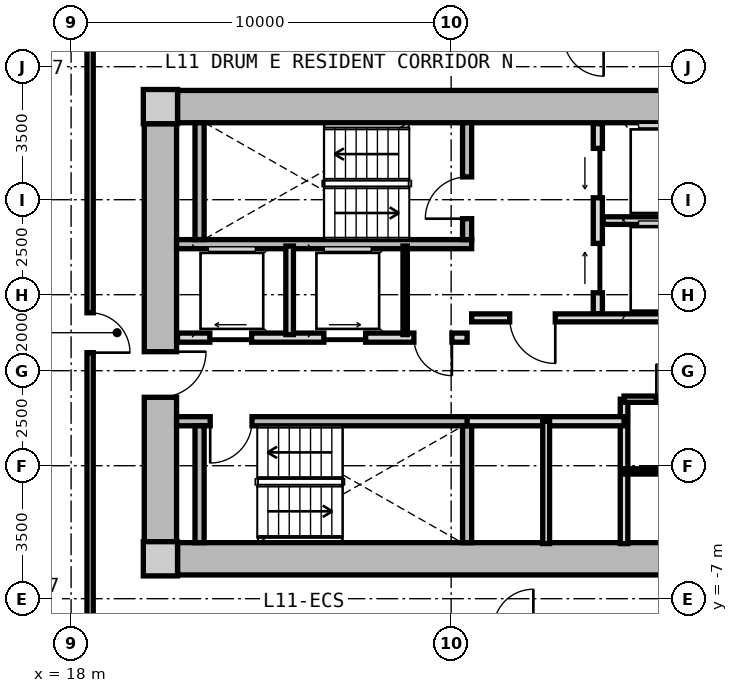
"""IFC4 building model, lengths in metres.
Left out: names, types, materials, properties, quantities, classifications, styles, units other than length and angle.
Written with IfcOpenShell. Run it as: python <this file> out.ifc"""

import sys

from ifc_helpers import new_model, si_unit, direction, frame, frame_2d, origin, origin_2d, place, context, subcontext, project, spatial, rectangle, extrude, source, transform, mapped, element, fill, save


model = new_model("IFC4")
c1 = context("Model", 3, precision=1e-05, world=origin(), true_north=direction((0.0, 1.0)))
c2 = subcontext(c1, "Body", "Model", "MODEL_VIEW")
j1 = project(units=[si_unit("LENGTHUNIT", "METRE"), si_unit("PLANEANGLEUNIT", "RADIAN")], contexts=[c1])
p1 = place(None, origin())
s1 = spatial("IfcSite", under=j1, at=p1, CompositionType="ELEMENT")
p2 = place(p1, origin())
s2 = spatial("IfcBuilding", under=s1, at=p2, CompositionType="ELEMENT")
p3 = place(p2, frame((0.0, 0.0, 39.9)))
s3 = spatial("IfcBuildingStorey", under=s2, at=p3, CompositionType="ELEMENT", Elevation=39.9)
m1 = source(origin(), c2, "Body", "SweptSolid", [
    extrude(rectangle(XDim=0.9, YDim=0.9, at=origin_2d()), origin(), (0.0, 0.0, 1.0), 3.05),
])
for number, where, z_axis, x_axis in (
    (1, (20.35, -5.95, 0.0), (0.0, 0.0, 1.0), (1.0, 0.0, 0.0)),
    (2, (20.35, 5.95, 0.0), (0.0, 0.0, 1.0), (1.0, 0.0, 0.0)),
):
    element("IfcColumn", number, at=place(p3, frame(where, z_axis=z_axis, x_axis=x_axis)), inside=s3, PredefinedType="COLUMN", context=c2, shape_type="MappedRepresentation", body=[
        mapped(m1, transform((0.0, 0.0, 0.0), x_axis=(1.0, 0.0, 0.0), y_axis=(0.0, 1.0, 0.0), z_axis=(0.0, 0.0, 1.0), scale=1.0)),
    ])
m2 = source(origin(), c2, "Body", "SweptSolid", [
    extrude(rectangle(XDim=14.4, YDim=0.85, at=frame_2d((7.2, 0.0))), origin(), (0.0, 0.0, 1.0), 2.79),
])
for number, where, z_axis, x_axis in (
    (3, (20.8, 5.95, 0.0), (0.0, 0.0, 1.0), (1.0, 0.0, 0.0)),
    (4, (35.2, -5.95, 0.0), (0.0, 0.0, 1.0), (-1.0, 0.0, 0.0)),
):
    element("IfcWall", number, at=place(p3, frame(where, z_axis=z_axis, x_axis=x_axis)), inside=s3, PredefinedType="SHEAR", context=c2, shape_type="MappedRepresentation", body=[
        mapped(m2, transform((0.0, 0.0, 0.0), x_axis=(1.0, 0.0, 0.0), y_axis=(0.0, 1.0, 0.0), z_axis=(0.0, 0.0, 1.0), scale=1.0)),
    ])
m3 = source(origin(), c2, "Body", "SweptSolid", [
    extrude(rectangle(XDim=11.0, YDim=0.85, at=frame_2d((5.5, 0.0))), origin(), (0.0, 0.0, 1.0), 2.79),
])
p4 = place(p3, frame((20.35, -5.5, 0.0), z_axis=(0.0, 0.0, 1.0), x_axis=(0.0, 1.0, 0.0)))
e5 = element("IfcWall", 5, at=p4, inside=s3, PredefinedType="SHEAR", context=c2, shape_type="MappedRepresentation", body=[
    mapped(m3, transform((0.0, 0.0, 0.0), x_axis=(1.0, 0.0, 0.0), y_axis=(0.0, 1.0, 0.0), z_axis=(0.0, 0.0, 1.0), scale=1.0)),
])
p5 = place(p4, frame((3.8, 0.0, 0.0)))
e6 = element("IfcOpeningElement", 6, at=p5, cuts=e5, PredefinedType="OPENING", context=c2, shape_type="SweptSolid", body=[
    extrude(rectangle(XDim=1.2, YDim=2.15, at=frame_2d((0.6, 1.075))), frame((0.0, 0.435, 0.0), z_axis=(0.0, -1.0, 0.0), x_axis=(1.0, 0.0, 0.0)), (0.0, 0.0, 1.0), 0.87),
])
m4 = source(origin(), c2, "Body", "SweptSolid", [
    extrude(rectangle(XDim=7.765, YDim=0.24, at=frame_2d((3.883, 0.0))), origin(), (0.0, 0.0, 1.0), 2.79),
])
p6 = place(p3, frame((20.775, 2.33, 0.0), z_axis=(0.0, 0.0, 1.0), x_axis=(1.0, 0.0, 0.0)))
e7 = element("IfcWall", 7, at=p6, inside=s3, PredefinedType="PARTITIONING", context=c2, shape_type="MappedRepresentation", body=[
    mapped(m4, transform((0.0, 0.0, 0.0), x_axis=(1.0, 0.0, 0.0), y_axis=(0.0, 1.0, 0.0), z_axis=(0.0, 0.0, 1.0), scale=1.0)),
])
m5 = source(origin(), c2, "Body", "SweptSolid", [
    extrude(rectangle(XDim=3.075, YDim=0.24, at=frame_2d((1.538, 0.0))), origin(), (0.0, 0.0, 1.0), 2.79),
])
p7 = place(p3, frame((21.38, 2.45, 0.0), z_axis=(0.0, 0.0, 1.0), x_axis=(0.0, 1.0, 0.0)))
e8 = element("IfcWall", 8, at=p7, inside=s3, PredefinedType="PARTITIONING", context=c2, shape_type="MappedRepresentation", body=[
    mapped(m5, transform((0.0, 0.0, 0.0), x_axis=(1.0, 0.0, 0.0), y_axis=(0.0, 1.0, 0.0), z_axis=(0.0, 0.0, 1.0), scale=1.0)),
])
p8 = place(p3, frame((28.42, 2.45, 0.0), z_axis=(0.0, 0.0, 1.0), x_axis=(0.0, 1.0, 0.0)))
e9 = element("IfcWall", 9, at=p8, inside=s3, PredefinedType="PARTITIONING", context=c2, shape_type="MappedRepresentation", body=[
    mapped(m5, transform((0.0, 0.0, 0.0), x_axis=(1.0, 0.0, 0.0), y_axis=(0.0, 1.0, 0.0), z_axis=(0.0, 0.0, 1.0), scale=1.0)),
])
p9 = place(p8, frame((0.55, 0.0, 0.0)))
e10 = element("IfcOpeningElement", 10, at=p9, cuts=e9, PredefinedType="OPENING", context=c2, shape_type="SweptSolid", body=[
    extrude(rectangle(XDim=1.1, YDim=2.15, at=frame_2d((0.55, 1.075))), frame((0.0, 0.13, 0.0), z_axis=(0.0, -1.0, 0.0), x_axis=(1.0, 0.0, 0.0)), (0.0, 0.0, 1.0), 0.26),
])
p10 = place(p3, frame((20.775, -2.33, 0.0), z_axis=(0.0, 0.0, 1.0), x_axis=(1.0, 0.0, 0.0)))
e11 = element("IfcWall", 11, at=p10, inside=s3, PredefinedType="PARTITIONING", context=c2, shape_type="MappedRepresentation", body=[
    mapped(m4, transform((0.0, 0.0, 0.0), x_axis=(1.0, 0.0, 0.0), y_axis=(0.0, 1.0, 0.0), z_axis=(0.0, 0.0, 1.0), scale=1.0)),
])
p11 = place(p10, frame((0.885, 0.0, 0.0)))
e12 = element("IfcOpeningElement", 12, at=p11, cuts=e11, PredefinedType="OPENING", context=c2, shape_type="SweptSolid", body=[
    extrude(rectangle(XDim=1.1, YDim=2.15, at=frame_2d((0.55, 1.075))), frame((0.0, 0.13, 0.0), z_axis=(0.0, -1.0, 0.0), x_axis=(1.0, 0.0, 0.0)), (0.0, 0.0, 1.0), 0.26),
])
for number, where, z_axis, x_axis in (
    (13, (21.38, -5.525, 0.0), (0.0, 0.0, 1.0), (0.0, 1.0, 0.0)),
    (14, (28.42, -5.525, 0.0), (0.0, 0.0, 1.0), (0.0, 1.0, 0.0)),
):
    element("IfcWall", number, at=place(p3, frame(where, z_axis=z_axis, x_axis=x_axis)), inside=s3, PredefinedType="PARTITIONING", context=c2, shape_type="MappedRepresentation", body=[
        mapped(m5, transform((0.0, 0.0, 0.0), x_axis=(1.0, 0.0, 0.0), y_axis=(0.0, 1.0, 0.0), z_axis=(0.0, 0.0, 1.0), scale=1.0)),
    ])
m6 = source(origin(), c2, "Body", "SweptSolid", [
    extrude(rectangle(XDim=5.0, YDim=0.24, at=frame_2d((2.5, 0.0))), origin(), (0.0, 0.0, 1.0), 2.775),
])
p12 = place(p3, frame((31.86, 0.5, 0.0), z_axis=(0.0, 0.0, 1.0), x_axis=(0.0, 1.0, 0.0)))
e15 = element("IfcWall", 15, at=p12, inside=s3, PredefinedType="PARTITIONING", context=c2, shape_type="MappedRepresentation", body=[
    mapped(m6, transform((0.0, 0.0, 0.0), x_axis=(1.0, 0.0, 0.0), y_axis=(0.0, 1.0, 0.0), z_axis=(0.0, 0.0, 1.0), scale=1.0)),
])
p13 = place(p12, frame((3.05, 0.0, 0.0)))
e16 = element("IfcOpeningElement", 16, at=p13, cuts=e15, PredefinedType="OPENING", context=c2, shape_type="SweptSolid", body=[
    extrude(rectangle(XDim=1.3, YDim=2.2, at=frame_2d((0.65, 1.1))), frame((0.0, 0.13, 0.0), z_axis=(0.0, -1.0, 0.0), x_axis=(1.0, 0.0, 0.0)), (0.0, 0.0, 1.0), 0.26),
])
p14 = place(p12, frame((0.55, 0.0, 0.0)))
e17 = element("IfcOpeningElement", 17, at=p14, cuts=e15, PredefinedType="OPENING", context=c2, shape_type="SweptSolid", body=[
    extrude(rectangle(XDim=1.3, YDim=2.2, at=frame_2d((0.65, 1.1))), frame((0.0, 0.13, 0.0), z_axis=(0.0, -1.0, 0.0), x_axis=(1.0, 0.0, 0.0)), (0.0, 0.0, 1.0), 0.26),
])
m7 = source(origin(), c2, "Body", "SweptSolid", [
    extrude(rectangle(XDim=3.2, YDim=0.2, at=frame_2d((1.6, 0.0))), origin(), (0.0, 0.0, 1.0), 2.775),
])
p15 = place(p3, frame((32.0, 2.95, 0.0), z_axis=(0.0, 0.0, 1.0), x_axis=(1.0, 0.0, 0.0)))
e18 = element("IfcWall", 18, at=p15, inside=s3, PredefinedType="PARTITIONING", context=c2, shape_type="MappedRepresentation", body=[
    mapped(m7, transform((0.0, 0.0, 0.0), x_axis=(1.0, 0.0, 0.0), y_axis=(0.0, 1.0, 0.0), z_axis=(0.0, 0.0, 1.0), scale=1.0)),
])
m8 = source(origin(), c2, "Body", "SweptSolid", [
    extrude(rectangle(XDim=6.66, YDim=0.21, at=frame_2d((3.33, 0.0))), origin(), (0.0, 0.0, 1.0), 2.775),
])
p16 = place(p3, frame((28.54, 0.39, 0.0), z_axis=(0.0, 0.0, 1.0), x_axis=(1.0, 0.0, 0.0)))
e19 = element("IfcWall", 19, at=p16, inside=s3, PredefinedType="PARTITIONING", context=c2, shape_type="MappedRepresentation", body=[
    mapped(m8, transform((0.0, 0.0, 0.0), x_axis=(1.0, 0.0, 0.0), y_axis=(0.0, 1.0, 0.0), z_axis=(0.0, 0.0, 1.0), scale=1.0)),
])
p17 = place(p16, frame((1.0, 0.0, 0.0)))
e20 = element("IfcOpeningElement", 20, at=p17, cuts=e19, PredefinedType="OPENING", context=c2, shape_type="SweptSolid", body=[
    extrude(rectangle(XDim=1.2, YDim=2.15, at=frame_2d((0.6, 1.075))), frame((0.0, 0.115, 0.0), z_axis=(0.0, -1.0, 0.0), x_axis=(1.0, 0.0, 0.0)), (0.0, 0.0, 1.0), 0.23),
])
m9 = source(origin(), c2, "Body", "SweptSolid", [
    extrude(rectangle(XDim=7.62, YDim=0.24, at=frame_2d((3.81, 0.0))), origin(), (0.0, 0.0, 1.0), 2.775),
])
p18 = place(p3, frame((20.8, -0.13, 0.0), z_axis=(0.0, 0.0, 1.0), x_axis=(1.0, 0.0, 0.0)))
e21 = element("IfcWall", 21, at=p18, inside=s3, PredefinedType="PARTITIONING", context=c2, shape_type="MappedRepresentation", body=[
    mapped(m9, transform((0.0, 0.0, 0.0), x_axis=(1.0, 0.0, 0.0), y_axis=(0.0, 1.0, 0.0), z_axis=(0.0, 0.0, 1.0), scale=1.0)),
])
p19 = place(p18, frame((6.22, 0.0, 0.0)))
e22 = element("IfcOpeningElement", 22, at=p19, cuts=e21, PredefinedType="OPENING", context=c2, shape_type="SweptSolid", body=[
    extrude(rectangle(XDim=1.0, YDim=2.1, at=frame_2d((0.5, 1.05))), frame((0.0, 0.13, 0.0), z_axis=(0.0, -1.0, 0.0), x_axis=(1.0, 0.0, 0.0)), (0.0, 0.0, 1.0), 0.26),
])
p20 = place(p18, frame((0.85, 0.0, 0.0)))
e23 = element("IfcOpeningElement", 23, at=p20, cuts=e21, PredefinedType="OPENING", context=c2, shape_type="SweptSolid", body=[
    extrude(rectangle(XDim=1.1, YDim=2.2, at=frame_2d((0.55, 1.1))), frame((0.0, 0.13, 0.0), z_axis=(0.0, -1.0, 0.0), x_axis=(1.0, 0.0, 0.0)), (0.0, 0.0, 1.0), 0.26),
])
p21 = place(p18, frame((3.85, 0.0, 0.0)))
e24 = element("IfcOpeningElement", 24, at=p21, cuts=e21, PredefinedType="OPENING", context=c2, shape_type="SweptSolid", body=[
    extrude(rectangle(XDim=1.1, YDim=2.2, at=frame_2d((0.55, 1.1))), frame((0.0, 0.13, 0.0), z_axis=(0.0, -1.0, 0.0), x_axis=(1.0, 0.0, 0.0)), (0.0, 0.0, 1.0), 0.26),
])
m10 = source(origin(), c2, "Body", "SweptSolid", [
    extrude(rectangle(XDim=2.33, YDim=0.115, at=frame_2d((1.165, 0.0))), origin(), (0.0, 0.0, 1.0), 2.775),
])
p22 = place(p3, frame((26.79, -0.05, 0.0), z_axis=(0.0, 0.0, 1.0), x_axis=(0.0, 1.0, 0.0)))
e25 = element("IfcWall", 25, at=p22, inside=s3, PredefinedType="PARTITIONING", context=c2, shape_type="MappedRepresentation", body=[
    mapped(m10, transform((0.0, 0.0, 0.0), x_axis=(1.0, 0.0, 0.0), y_axis=(0.0, 1.0, 0.0), z_axis=(0.0, 0.0, 1.0), scale=1.0)),
])
m11 = source(origin(), c2, "Body", "SweptSolid", [
    extrude(rectangle(XDim=2.33, YDim=0.2, at=frame_2d((1.165, 0.0))), origin(), (0.0, 0.0, 1.0), 2.775),
])
p23 = place(p3, frame((23.75, -0.05, 0.0), z_axis=(0.0, 0.0, 1.0), x_axis=(0.0, 1.0, 0.0)))
e26 = element("IfcWall", 26, at=p23, inside=s3, PredefinedType="PARTITIONING", context=c2, shape_type="MappedRepresentation", body=[
    mapped(m11, transform((0.0, 0.0, 0.0), x_axis=(1.0, 0.0, 0.0), y_axis=(0.0, 1.0, 0.0), z_axis=(0.0, 0.0, 1.0), scale=1.0)),
])
m12 = source(origin(), c2, "Body", "SweptSolid", [
    extrude(rectangle(XDim=3.8, YDim=0.2, at=frame_2d((1.9, 0.0))), origin(), (0.0, 0.0, 1.0), 2.775),
])
p24 = place(p3, frame((32.55, -5.55, 0.0), z_axis=(0.0, 0.0, 1.0), x_axis=(0.0, 1.0, 0.0)))
e27 = element("IfcWall", 27, at=p24, inside=s3, PredefinedType="PARTITIONING", context=c2, shape_type="MappedRepresentation", body=[
    mapped(m12, transform((0.0, 0.0, 0.0), x_axis=(1.0, 0.0, 0.0), y_axis=(0.0, 1.0, 0.0), z_axis=(0.0, 0.0, 1.0), scale=1.0)),
])
m13 = source(origin(), c2, "Body", "SweptSolid", [
    extrude(rectangle(XDim=4.13, YDim=0.24, at=frame_2d((2.065, 0.0))), origin(), (0.0, 0.0, 1.0), 2.775),
])
p25 = place(p3, frame((28.42, -2.33, 0.0), z_axis=(0.0, 0.0, 1.0), x_axis=(1.0, 0.0, 0.0)))
e28 = element("IfcWall", 28, at=p25, inside=s3, PredefinedType="PARTITIONING", context=c2, shape_type="MappedRepresentation", body=[
    mapped(m13, transform((0.0, 0.0, 0.0), x_axis=(1.0, 0.0, 0.0), y_axis=(0.0, 1.0, 0.0), z_axis=(0.0, 0.0, 1.0), scale=1.0)),
])
m14 = source(origin(), c2, "Body", "SweptSolid", [
    extrude(rectangle(XDim=3.22, YDim=0.18, at=frame_2d((1.61, 0.0))), origin(), (0.0, 0.0, 1.0), 2.775),
])
p26 = place(p3, frame((30.5, -5.55, 0.0), z_axis=(0.0, 0.0, 1.0), x_axis=(0.0, 1.0, 0.0)))
e29 = element("IfcWall", 29, at=p26, inside=s3, PredefinedType="PARTITIONING", context=c2, shape_type="MappedRepresentation", body=[
    mapped(m14, transform((0.0, 0.0, 0.0), x_axis=(1.0, 0.0, 0.0), y_axis=(0.0, 1.0, 0.0), z_axis=(0.0, 0.0, 1.0), scale=1.0)),
])
m15 = source(origin(), c2, "Body", "SweptSolid", [
    extrude(rectangle(XDim=2.7, YDim=0.165, at=frame_2d((1.35, 0.0))), origin(), (0.0, 0.0, 1.0), 2.775),
])
p27 = place(p3, frame((32.55, -1.75, 0.0), z_axis=(0.0, 0.0, 1.0), x_axis=(1.0, 0.0, 0.0)))
e30 = element("IfcWall", 30, at=p27, inside=s3, PredefinedType="PARTITIONING", context=c2, shape_type="MappedRepresentation", body=[
    mapped(m15, transform((0.0, 0.0, 0.0), x_axis=(1.0, 0.0, 0.0), y_axis=(0.0, 1.0, 0.0), z_axis=(0.0, 0.0, 1.0), scale=1.0)),
])
p28 = place(p27, frame((0.85, 0.0, 0.0)))
e31 = element("IfcOpeningElement", 31, at=p28, cuts=e30, PredefinedType="OPENING", context=c2, shape_type="SweptSolid", body=[
    extrude(rectangle(XDim=0.925, YDim=2.1, at=frame_2d((0.462, 1.05))), frame((0.0, 0.093, 0.0), z_axis=(0.0, -1.0, 0.0), x_axis=(1.0, 0.0, 0.0)), (0.0, 0.0, 1.0), 0.185),
])
m16 = source(origin(), c2, "Body", "SweptSolid", [
    extrude(rectangle(XDim=2.7, YDim=0.14, at=frame_2d((1.35, 0.0))), origin(), (0.0, 0.0, 1.0), 2.775),
])
p29 = place(p3, frame((32.55, -3.65, 0.0), z_axis=(0.0, 0.0, 1.0), x_axis=(1.0, 0.0, 0.0)))
e32 = element("IfcWall", 32, at=p29, inside=s3, PredefinedType="PARTITIONING", context=c2, shape_type="MappedRepresentation", body=[
    mapped(m16, transform((0.0, 0.0, 0.0), x_axis=(1.0, 0.0, 0.0), y_axis=(0.0, 1.0, 0.0), z_axis=(0.0, 0.0, 1.0), scale=1.0)),
])
m17 = source(origin(), c2, "Body", "SweptSolid", [
    extrude(rectangle(XDim=15.6, YDim=0.165, at=frame_2d((7.8, 0.0))), origin(), (0.0, 0.0, 1.0), 2.775),
])
p30 = place(p3, frame((18.5, -7.8, 0.0), z_axis=(0.0, 0.0, 1.0), x_axis=(0.0, 1.0, 0.0)))
e33 = element("IfcWall", 33, at=p30, inside=s3, PredefinedType="PARTITIONING", context=c2, shape_type="MappedRepresentation", body=[
    mapped(m17, transform((0.0, 0.0, 0.0), x_axis=(1.0, 0.0, 0.0), y_axis=(0.0, 1.0, 0.0), z_axis=(0.0, 0.0, 1.0), scale=1.0)),
])
p31 = place(p30, frame((7.275, 0.0, 0.0)))
e34 = element("IfcOpeningElement", 34, at=p31, cuts=e33, PredefinedType="OPENING", context=c2, shape_type="SweptSolid", body=[
    extrude(rectangle(XDim=1.05, YDim=2.15, at=frame_2d((0.525, 1.075))), frame((0.0, 0.093, 0.0), z_axis=(0.0, -1.0, 0.0), x_axis=(1.0, 0.0, 0.0)), (0.0, 0.0, 1.0), 0.185),
])
m18 = source(origin(), c2, "Body", "SweptSolid", [
    extrude(rectangle(XDim=1.1, YDim=2.15, at=frame_2d((0.55, 1.075))), frame((0.0, 0.025, 0.0), z_axis=(0.0, -1.0, 0.0), x_axis=(1.0, 0.0, 0.0)), (0.0, 0.0, 1.0), 0.05),
])
p32 = place(p9, origin())
e35 = element("IfcDoor", 35, at=p32, inside=s3, OperationType="SINGLE_SWING_LEFT", PredefinedType="DOOR", context=c2, shape_type="MappedRepresentation", body=[
    mapped(m18, transform((0.0, 0.0, 0.0), x_axis=(1.0, 0.0, 0.0), y_axis=(0.0, 1.0, 0.0), z_axis=(0.0, 0.0, 1.0), scale=1.0)),
])
fill(e10, e35)
p33 = place(p11, frame((1.1, 0.0, 0.0), z_axis=(0.0, 0.0, 1.0), x_axis=(-1.0, 0.0, 0.0)))
e36 = element("IfcDoor", 36, at=p33, inside=s3, OperationType="SINGLE_SWING_RIGHT", PredefinedType="DOOR", context=c2, shape_type="MappedRepresentation", body=[
    mapped(m18, transform((0.0, 0.0, 0.0), x_axis=(1.0, 0.0, 0.0), y_axis=(0.0, 1.0, 0.0), z_axis=(0.0, 0.0, 1.0), scale=1.0)),
])
fill(e12, e36)
m19 = source(origin(), c2, "Body", "SweptSolid", [
    extrude(rectangle(XDim=1.3, YDim=2.2, at=frame_2d((0.65, 1.1))), frame((0.0, 0.025, 0.0), z_axis=(0.0, -1.0, 0.0), x_axis=(1.0, 0.0, 0.0)), (0.0, 0.0, 1.0), 0.05),
])
p34 = place(p13, origin())
e37 = element("IfcDoor", 37, at=p34, inside=s3, OperationType="SLIDING_TO_LEFT", PredefinedType="DOOR", context=c2, shape_type="MappedRepresentation", body=[
    mapped(m19, transform((0.0, 0.0, 0.0), x_axis=(1.0, 0.0, 0.0), y_axis=(0.0, 1.0, 0.0), z_axis=(0.0, 0.0, 1.0), scale=1.0)),
])
fill(e16, e37)
p35 = place(p14, origin())
e38 = element("IfcDoor", 38, at=p35, inside=s3, OperationType="SLIDING_TO_RIGHT", PredefinedType="DOOR", context=c2, shape_type="MappedRepresentation", body=[
    mapped(m19, transform((0.0, 0.0, 0.0), x_axis=(1.0, 0.0, 0.0), y_axis=(0.0, 1.0, 0.0), z_axis=(0.0, 0.0, 1.0), scale=1.0)),
])
fill(e17, e38)
m20 = source(origin(), c2, "Body", "SweptSolid", [
    extrude(rectangle(XDim=1.2, YDim=2.15, at=frame_2d((0.6, 1.075))), frame((0.0, 0.025, 0.0), z_axis=(0.0, -1.0, 0.0), x_axis=(1.0, 0.0, 0.0)), (0.0, 0.0, 1.0), 0.05),
])
p36 = place(p17, frame((1.2, 0.0, 0.0), z_axis=(0.0, 0.0, 1.0), x_axis=(-1.0, 0.0, 0.0)))
e39 = element("IfcDoor", 39, at=p36, inside=s3, OperationType="SINGLE_SWING_LEFT", PredefinedType="DOOR", context=c2, shape_type="MappedRepresentation", body=[
    mapped(m20, transform((0.0, 0.0, 0.0), x_axis=(1.0, 0.0, 0.0), y_axis=(0.0, 1.0, 0.0), z_axis=(0.0, 0.0, 1.0), scale=1.0)),
])
fill(e20, e39)
p37 = place(p5, frame((1.2, 0.0, 0.0), z_axis=(0.0, 0.0, 1.0), x_axis=(-1.0, 0.0, 0.0)))
e40 = element("IfcDoor", 40, at=p37, inside=s3, OperationType="SINGLE_SWING_LEFT", PredefinedType="DOOR", context=c2, shape_type="MappedRepresentation", body=[
    mapped(m20, transform((0.0, 0.0, 0.0), x_axis=(1.0, 0.0, 0.0), y_axis=(0.0, 1.0, 0.0), z_axis=(0.0, 0.0, 1.0), scale=1.0)),
])
fill(e6, e40)
m21 = source(origin(), c2, "Body", "SweptSolid", [
    extrude(rectangle(XDim=1.0, YDim=2.1, at=frame_2d((0.5, 1.05))), frame((0.0, 0.025, 0.0), z_axis=(0.0, -1.0, 0.0), x_axis=(1.0, 0.0, 0.0)), (0.0, 0.0, 1.0), 0.05),
])
p38 = place(p19, frame((1.0, 0.0, 0.0), z_axis=(0.0, 0.0, 1.0), x_axis=(-1.0, 0.0, 0.0)))
e41 = element("IfcDoor", 41, at=p38, inside=s3, OperationType="SINGLE_SWING_LEFT", PredefinedType="DOOR", context=c2, shape_type="MappedRepresentation", body=[
    mapped(m21, transform((0.0, 0.0, 0.0), x_axis=(1.0, 0.0, 0.0), y_axis=(0.0, 1.0, 0.0), z_axis=(0.0, 0.0, 1.0), scale=1.0)),
])
fill(e22, e41)
m22 = source(origin(), c2, "Body", "SweptSolid", [
    extrude(rectangle(XDim=1.1, YDim=2.2, at=frame_2d((0.55, 1.1))), frame((0.0, 0.025, 0.0), z_axis=(0.0, -1.0, 0.0), x_axis=(1.0, 0.0, 0.0)), (0.0, 0.0, 1.0), 0.05),
])
p39 = place(p20, origin())
e42 = element("IfcDoor", 42, at=p39, inside=s3, OperationType="SLIDING_TO_LEFT", PredefinedType="DOOR", context=c2, shape_type="MappedRepresentation", body=[
    mapped(m22, transform((0.0, 0.0, 0.0), x_axis=(1.0, 0.0, 0.0), y_axis=(0.0, 1.0, 0.0), z_axis=(0.0, 0.0, 1.0), scale=1.0)),
])
fill(e23, e42)
p40 = place(p21, origin())
e43 = element("IfcDoor", 43, at=p40, inside=s3, OperationType="SLIDING_TO_RIGHT", PredefinedType="DOOR", context=c2, shape_type="MappedRepresentation", body=[
    mapped(m22, transform((0.0, 0.0, 0.0), x_axis=(1.0, 0.0, 0.0), y_axis=(0.0, 1.0, 0.0), z_axis=(0.0, 0.0, 1.0), scale=1.0)),
])
fill(e24, e43)
m23 = source(origin(), c2, "Body", "SweptSolid", [
    extrude(rectangle(XDim=0.925, YDim=2.1, at=frame_2d((0.462, 1.05))), frame((0.0, 0.025, 0.0), z_axis=(0.0, -1.0, 0.0), x_axis=(1.0, 0.0, 0.0)), (0.0, 0.0, 1.0), 0.05),
])
p41 = place(p28, origin())
e44 = element("IfcDoor", 44, at=p41, inside=s3, OperationType="SINGLE_SWING_LEFT", PredefinedType="DOOR", context=c2, shape_type="MappedRepresentation", body=[
    mapped(m23, transform((0.0, 0.0, 0.0), x_axis=(1.0, 0.0, 0.0), y_axis=(0.0, 1.0, 0.0), z_axis=(0.0, 0.0, 1.0), scale=1.0)),
])
fill(e31, e44)
m24 = source(origin(), c2, "Body", "SweptSolid", [
    extrude(rectangle(XDim=1.05, YDim=2.15, at=frame_2d((0.525, 1.075))), frame((0.0, 0.025, 0.0), z_axis=(0.0, -1.0, 0.0), x_axis=(1.0, 0.0, 0.0)), (0.0, 0.0, 1.0), 0.05),
])
p42 = place(p31, frame((1.05, 0.0, 0.0), z_axis=(0.0, 0.0, 1.0), x_axis=(-1.0, 0.0, 0.0)))
e45 = element("IfcDoor", 45, at=p42, inside=s3, OperationType="SINGLE_SWING_RIGHT", PredefinedType="DOOR", context=c2, shape_type="MappedRepresentation", body=[
    mapped(m24, transform((0.0, 0.0, 0.0), x_axis=(1.0, 0.0, 0.0), y_axis=(0.0, 1.0, 0.0), z_axis=(0.0, 0.0, 1.0), scale=1.0)),
])
fill(e34, e45)
save(model, sys.argv[1])
